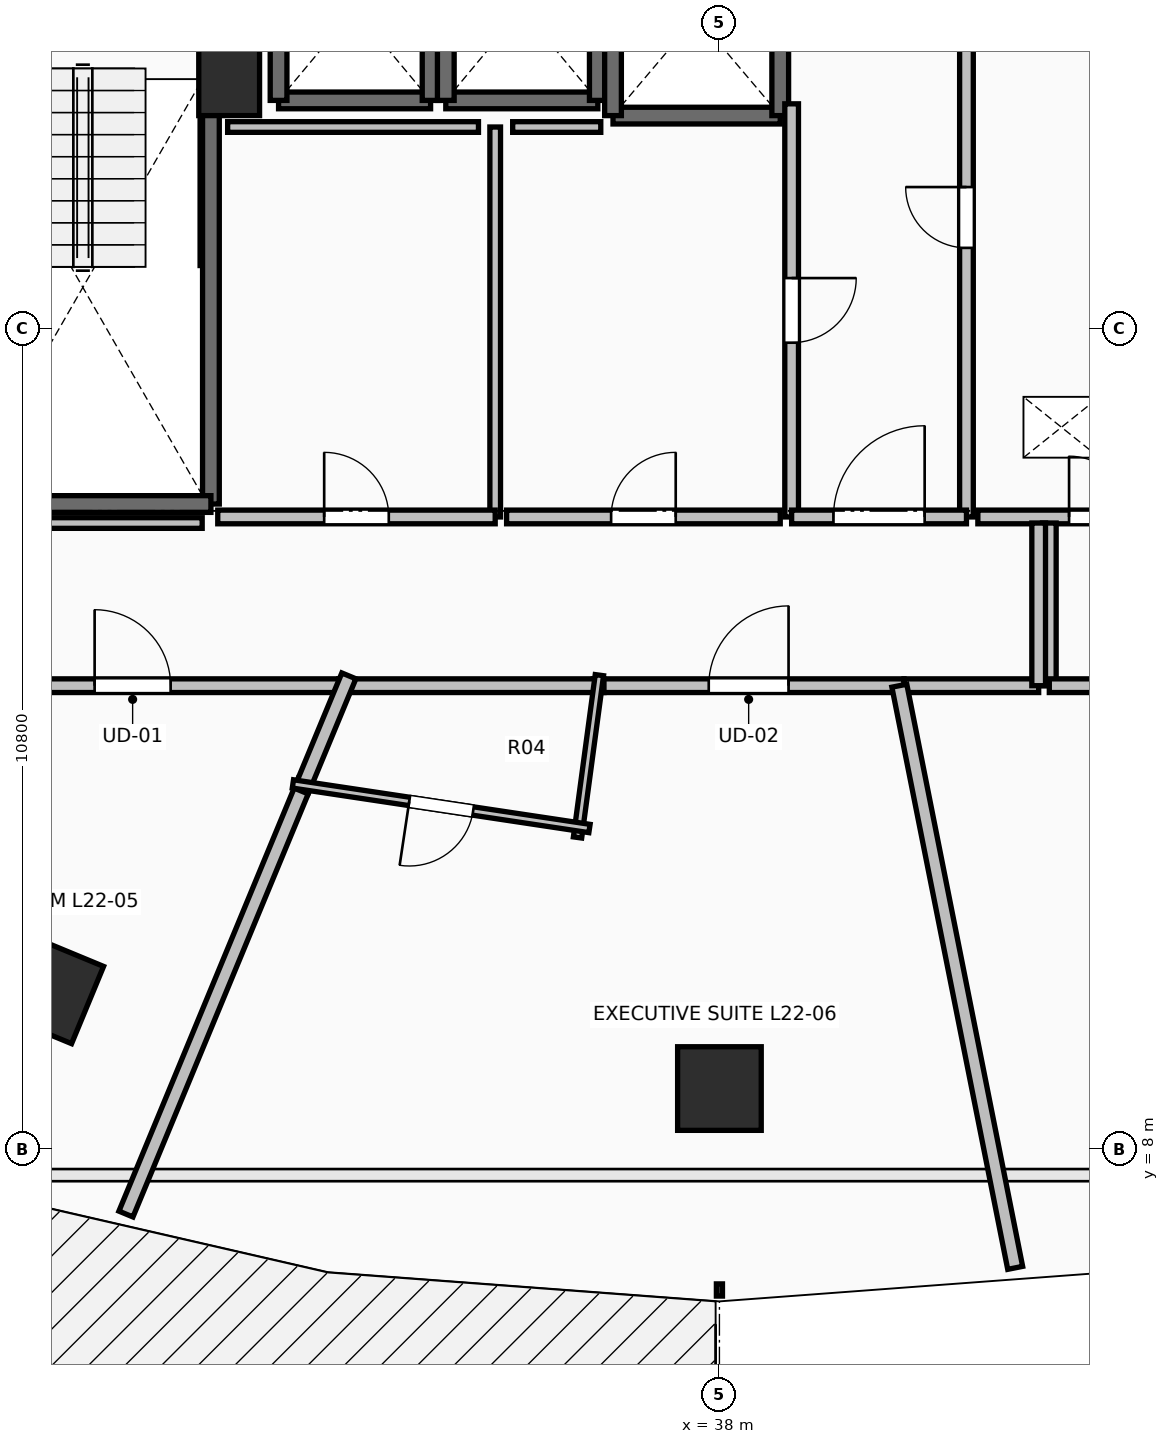
"""IFC4 building model, lengths in metres.
Left out: names, types, materials, properties, quantities, classifications, styles, units other than length and angle.
Written with IfcOpenShell. Run it as: python <this file> out.ifc"""

import sys

from ifc_helpers import new_model, si_unit, direction, frame, frame_2d, origin, origin_2d, place, context, subcontext, project, spatial, rectangle, extrude, element, fill, save


model = new_model("IFC4")
c1 = context("Model", 3, precision=1e-05, world=origin(), true_north=direction((0.0, 1.0)))
c2 = subcontext(c1, "Body", "Model", "MODEL_VIEW")
j1 = project(units=[si_unit("LENGTHUNIT", "METRE"), si_unit("PLANEANGLEUNIT", "RADIAN")], contexts=[c1])
p1 = place(None, origin())
s1 = spatial("IfcSite", under=j1, at=p1, CompositionType="ELEMENT")
p2 = place(p1, origin())
s2 = spatial("IfcBuilding", under=s1, at=p2, CompositionType="ELEMENT")
p3 = place(p2, frame((0.0, 0.0, 85.8)))
s3 = spatial("IfcBuildingStorey", under=s2, at=p3, CompositionType="ELEMENT", Elevation=85.8)
for number, where, z_axis, x_axis in (
    (1, (29.179, 10.109, 0.0), (0.0, 0.0, 1.0), (-0.383, -0.924, 0.0)),
    (2, (38.0, 8.8, 0.0), (0.0, 0.0, 1.0), (0.0, -1.0, 0.0)),
):
    element("IfcColumn", number, at=place(p3, frame(where, z_axis=z_axis, x_axis=x_axis)), inside=s3, PredefinedType="COLUMN", context=c2, shape_type="SweptSolid", body=[
        extrude(rectangle(XDim=1.1, YDim=1.1, at=origin_2d()), origin(), (0.0, 0.0, 1.0), 3.5),
    ])
p4 = place(p3, frame((31.55, 22.2, 0.0), z_axis=(0.0, 0.0, 1.0), x_axis=(1.0, 0.0, 0.0)))
e3 = element("IfcColumn", 3, at=p4, inside=s3, PredefinedType="PILASTER", context=c2, shape_type="SweptSolid", body=[
    extrude(rectangle(XDim=0.8, YDim=1.2, at=origin_2d()), origin(), (0.0, 0.0, 1.0), 3.5),
])
p5 = place(p3, frame((31.31, 23.91, 0.0), z_axis=(0.0, 0.0, 1.0), x_axis=(0.0, -1.0, 0.0)))
e4 = element("IfcWall", 4, at=p5, inside=s3, PredefinedType="SOLIDWALL", context=c2, shape_type="SweptSolid", body=[
    extrude(rectangle(XDim=7.42, YDim=0.22, at=frame_2d((3.71, 0.0))), origin(), (0.0, 0.0, 1.0), 3.24),
])
p6 = place(p3, frame((31.31, 16.49, 0.0), z_axis=(0.0, 0.0, 1.0), x_axis=(-1.0, 0.0, 0.0)))
e5 = element("IfcWall", 5, at=p6, inside=s3, PredefinedType="SOLIDWALL", context=c2, shape_type="SweptSolid", body=[
    extrude(rectangle(XDim=3.37, YDim=0.22, at=frame_2d((1.685, 0.0))), origin(), (0.0, 0.0, 1.0), 3.24),
])
p7 = place(p3, frame((32.2, 21.8, 0.0), z_axis=(0.0, 0.0, 1.0), x_axis=(1.0, 0.0, 0.0)))
e6 = element("IfcWall", 6, at=p7, inside=s3, PredefinedType="SOLIDWALL", context=c2, shape_type="SweptSolid", body=[
    extrude(rectangle(XDim=2.0, YDim=0.22, at=frame_2d((1.0, 0.0))), origin(), (0.0, 0.0, 1.0), 3.24),
])
for number, where, z_axis, x_axis in (
    (7, (34.2, 21.8, 0.0), (0.0, 0.0, 1.0), (0.0, 1.0, 0.0)),
    (8, (32.2, 24.2, 0.0), (0.0, 0.0, 1.0), (0.0, -1.0, 0.0)),
):
    element("IfcWall", number, at=place(p3, frame(where, z_axis=z_axis, x_axis=x_axis)), inside=s3, PredefinedType="SOLIDWALL", context=c2, shape_type="SweptSolid", body=[
        extrude(rectangle(XDim=2.4, YDim=0.22, at=frame_2d((1.2, 0.0))), origin(), (0.0, 0.0, 1.0), 3.24),
    ])
p8 = place(p3, frame((34.4, 21.8, 0.0), z_axis=(0.0, 0.0, 1.0), x_axis=(1.0, 0.0, 0.0)))
e9 = element("IfcWall", 9, at=p8, inside=s3, PredefinedType="SOLIDWALL", context=c2, shape_type="SweptSolid", body=[
    extrude(rectangle(XDim=2.0, YDim=0.22, at=frame_2d((1.0, 0.0))), origin(), (0.0, 0.0, 1.0), 3.24),
])
for number, where, z_axis, x_axis in (
    (10, (36.4, 21.8, 0.0), (0.0, 0.0, 1.0), (0.0, 1.0, 0.0)),
    (11, (34.4, 24.2, 0.0), (0.0, 0.0, 1.0), (0.0, -1.0, 0.0)),
):
    element("IfcWall", number, at=place(p3, frame(where, z_axis=z_axis, x_axis=x_axis)), inside=s3, PredefinedType="SOLIDWALL", context=c2, shape_type="SweptSolid", body=[
        extrude(rectangle(XDim=2.4, YDim=0.22, at=frame_2d((1.2, 0.0))), origin(), (0.0, 0.0, 1.0), 3.24),
    ])
p9 = place(p3, frame((36.6, 21.6, 0.0), z_axis=(0.0, 0.0, 1.0), x_axis=(1.0, 0.0, 0.0)))
e12 = element("IfcWall", 12, at=p9, inside=s3, PredefinedType="SOLIDWALL", context=c2, shape_type="SweptSolid", body=[
    extrude(rectangle(XDim=2.2, YDim=0.22, at=frame_2d((1.1, 0.0))), origin(), (0.0, 0.0, 1.0), 3.24),
])
for number, where, z_axis, x_axis in (
    (13, (38.8, 21.6, 0.0), (0.0, 0.0, 1.0), (0.0, 1.0, 0.0)),
    (14, (36.6, 24.2, 0.0), (0.0, 0.0, 1.0), (0.0, -1.0, 0.0)),
):
    element("IfcWall", number, at=place(p3, frame(where, z_axis=z_axis, x_axis=x_axis)), inside=s3, PredefinedType="SOLIDWALL", context=c2, shape_type="SweptSolid", body=[
        extrude(rectangle(XDim=2.6, YDim=0.22, at=frame_2d((1.3, 0.0))), origin(), (0.0, 0.0, 1.0), 3.24),
    ])
p10 = place(p3, frame((41.25, 16.32, 0.0), z_axis=(0.0, 0.0, 1.0), x_axis=(0.0, 1.0, 0.0)))
e15 = element("IfcWall", 15, at=p10, inside=s3, PredefinedType="PARTITIONING", context=c2, shape_type="SweptSolid", body=[
    extrude(rectangle(XDim=7.88, YDim=0.18, at=frame_2d((3.94, 0.0))), origin(), (0.0, 0.0, 1.0), 3.24),
])
p11 = place(p10, frame((3.54, 0.0, 0.0)))
e16 = element("IfcOpeningElement", 16, at=p11, cuts=e15, PredefinedType="OPENING", context=c2, shape_type="SweptSolid", body=[
    extrude(rectangle(XDim=0.8, YDim=2.05, at=frame_2d((0.4, 1.025))), frame((0.0, 0.105, 0.0), z_axis=(0.0, -1.0, 0.0), x_axis=(1.0, 0.0, 0.0)), (0.0, 0.0, 1.0), 0.21),
])
p12 = place(p3, frame((38.95, 21.755, 0.0), z_axis=(0.0, 0.0, 1.0), x_axis=(0.0, -1.0, 0.0)))
e17 = element("IfcWall", 17, at=p12, inside=s3, PredefinedType="PARTITIONING", context=c2, shape_type="SweptSolid", body=[
    extrude(rectangle(XDim=5.435, YDim=0.18, at=frame_2d((2.717, 0.0))), origin(), (0.0, 0.0, 1.0), 3.24),
])
p13 = place(p12, frame((2.292, 0.0, 0.0)))
e18 = element("IfcOpeningElement", 18, at=p13, cuts=e17, PredefinedType="OPENING", context=c2, shape_type="SweptSolid", body=[
    extrude(rectangle(XDim=0.85, YDim=2.1, at=frame_2d((0.425, 1.05))), frame((0.0, 0.105, 0.0), z_axis=(0.0, -1.0, 0.0), x_axis=(1.0, 0.0, 0.0)), (0.0, 0.0, 1.0), 0.21),
])
p14 = place(p3, frame((38.95, 16.32, 0.0), z_axis=(0.0, 0.0, 1.0), x_axis=(1.0, 0.0, 0.0)))
e19 = element("IfcWall", 19, at=p14, inside=s3, PredefinedType="PARTITIONING", context=c2, shape_type="SweptSolid", body=[
    extrude(rectangle(XDim=2.3, YDim=0.18, at=frame_2d((1.15, 0.0))), origin(), (0.0, 0.0, 1.0), 3.24),
])
p15 = place(p14, frame((0.55, 0.0, 0.0)))
e20 = element("IfcOpeningElement", 20, at=p15, cuts=e19, PredefinedType="OPENING", context=c2, shape_type="SweptSolid", body=[
    extrude(rectangle(XDim=1.2, YDim=2.15, at=frame_2d((0.6, 1.075))), frame((0.0, 0.105, 0.0), z_axis=(0.0, -1.0, 0.0), x_axis=(1.0, 0.0, 0.0)), (0.0, 0.0, 1.0), 0.21),
])
p16 = place(p3, frame((41.4, 16.32, 0.0), z_axis=(0.0, 0.0, 1.0), x_axis=(1.0, 0.0, 0.0)))
e21 = element("IfcWall", 21, at=p16, inside=s3, PredefinedType="PARTITIONING", context=c2, shape_type="SweptSolid", body=[
    extrude(rectangle(XDim=3.2, YDim=0.18, at=frame_2d((1.6, 0.0))), origin(), (0.0, 0.0, 1.0), 3.24),
])
p17 = place(p16, frame((1.2, 0.0, 0.0)))
e22 = element("IfcOpeningElement", 22, at=p17, cuts=e21, PredefinedType="OPENING", context=c2, shape_type="SweptSolid", body=[
    extrude(rectangle(XDim=0.8, YDim=2.05, at=frame_2d((0.4, 1.025))), frame((0.0, 0.105, 0.0), z_axis=(0.0, -1.0, 0.0), x_axis=(1.0, 0.0, 0.0)), (0.0, 0.0, 1.0), 0.21),
])
p18 = place(p3, frame((35.05, 16.32, 0.0), z_axis=(0.0, 0.0, 1.0), x_axis=(0.0, 1.0, 0.0)))
e23 = element("IfcWall", 23, at=p18, inside=s3, PredefinedType="PARTITIONING", context=c2, shape_type="SweptSolid", body=[
    extrude(rectangle(XDim=5.13, YDim=0.14, at=frame_2d((2.565, 0.0))), origin(), (0.0, 0.0, 1.0), 3.24),
])
p19 = place(p3, frame((31.4, 16.32, 0.0), z_axis=(0.0, 0.0, 1.0), x_axis=(1.0, 0.0, 0.0)))
e24 = element("IfcWall", 24, at=p19, inside=s3, PredefinedType="PARTITIONING", context=c2, shape_type="SweptSolid", body=[
    extrude(rectangle(XDim=3.65, YDim=0.18, at=frame_2d((1.825, 0.0))), origin(), (0.0, 0.0, 1.0), 3.24),
])
p20 = place(p19, frame((1.4, 0.0, 0.0)))
e25 = element("IfcOpeningElement", 25, at=p20, cuts=e24, PredefinedType="OPENING", context=c2, shape_type="SweptSolid", body=[
    extrude(rectangle(XDim=0.85, YDim=2.1, at=frame_2d((0.425, 1.05))), frame((0.0, 0.105, 0.0), z_axis=(0.0, -1.0, 0.0), x_axis=(1.0, 0.0, 0.0)), (0.0, 0.0, 1.0), 0.21),
])
p21 = place(p3, frame((35.2, 16.32, 0.0), z_axis=(0.0, 0.0, 1.0), x_axis=(1.0, 0.0, 0.0)))
e26 = element("IfcWall", 26, at=p21, inside=s3, PredefinedType="PARTITIONING", context=c2, shape_type="SweptSolid", body=[
    extrude(rectangle(XDim=3.6, YDim=0.18, at=frame_2d((1.8, 0.0))), origin(), (0.0, 0.0, 1.0), 3.24),
])
p22 = place(p21, frame((1.375, 0.0, 0.0)))
e27 = element("IfcOpeningElement", 27, at=p22, cuts=e26, PredefinedType="OPENING", context=c2, shape_type="SweptSolid", body=[
    extrude(rectangle(XDim=0.85, YDim=2.1, at=frame_2d((0.425, 1.05))), frame((0.0, 0.105, 0.0), z_axis=(0.0, -1.0, 0.0), x_axis=(1.0, 0.0, 0.0)), (0.0, 0.0, 1.0), 0.21),
])
p23 = place(p3, frame((27.429, 14.1, 0.0), z_axis=(0.0, 0.0, 1.0), x_axis=(1.0, 0.0, 0.0)))
e28 = element("IfcWall", 28, at=p23, inside=s3, PredefinedType="PARTITIONING", context=c2, shape_type="SweptSolid", body=[
    extrude(rectangle(XDim=5.702, YDim=0.18, at=frame_2d((2.851, 0.0))), origin(), (0.0, 0.0, 1.0), 2.432),
])
p24 = place(p23, frame((2.351, 0.0, 0.0)))
e29 = element("IfcOpeningElement", 29, at=p24, cuts=e28, PredefinedType="OPENING", context=c2, shape_type="SweptSolid", body=[
    extrude(rectangle(XDim=1.0, YDim=2.15, at=frame_2d((0.5, 1.075))), frame((0.0, 0.105, 0.0), z_axis=(0.0, -1.0, 0.0), x_axis=(1.0, 0.0, 0.0)), (0.0, 0.0, 1.0), 0.21),
])
p25 = place(p3, frame((36.341, 14.1, 0.0), z_axis=(0.0, 0.0, 1.0), x_axis=(1.0, 0.0, 0.0)))
e30 = element("IfcWall", 30, at=p25, inside=s3, PredefinedType="PARTITIONING", context=c2, shape_type="SweptSolid", body=[
    extrude(rectangle(XDim=4.087, YDim=0.18, at=frame_2d((2.043, 0.0))), origin(), (0.0, 0.0, 1.0), 2.922),
])
p26 = place(p25, frame((1.519, 0.0, 0.0)))
e31 = element("IfcOpeningElement", 31, at=p26, cuts=e30, PredefinedType="OPENING", context=c2, shape_type="SweptSolid", body=[
    extrude(rectangle(XDim=1.05, YDim=2.2, at=frame_2d((0.525, 1.1))), frame((0.0, 0.105, 0.0), z_axis=(0.0, -1.0, 0.0), x_axis=(1.0, 0.0, 0.0)), (0.0, 0.0, 1.0), 0.21),
])
p27 = place(p3, frame((32.991, 14.1, 0.0), z_axis=(0.0, 0.0, 1.0), x_axis=(1.0, 0.0, 0.0)))
e32 = element("IfcWall", 32, at=p27, inside=s3, PredefinedType="PARTITIONING", context=c2, shape_type="SweptSolid", body=[
    extrude(rectangle(XDim=3.49, YDim=0.18, at=frame_2d((1.745, 0.0))), origin(), (0.0, 0.0, 1.0), 2.922),
])
p28 = place(p3, frame((42.34, 16.24, 0.0), z_axis=(0.0, 0.0, 1.0), x_axis=(0.0, -1.0, 0.0)))
e33 = element("IfcWall", 33, at=p28, inside=s3, PredefinedType="PARTITIONING", context=c2, shape_type="SweptSolid", body=[
    extrude(rectangle(XDim=2.14, YDim=0.18, at=frame_2d((1.07, 0.0))), origin(), (0.0, 0.0, 1.0), 2.922),
])
p29 = place(p3, frame((42.34, 14.1, 0.0), z_axis=(0.0, 0.0, 1.0), x_axis=(1.0, 0.0, 0.0)))
e34 = element("IfcWall", 34, at=p29, inside=s3, PredefinedType="PARTITIONING", context=c2, shape_type="SweptSolid", body=[
    extrude(rectangle(XDim=8.41, YDim=0.18, at=frame_2d((4.205, 0.0))), origin(), (0.0, 0.0, 1.0), 2.432),
])
p30 = place(p29, frame((3.705, 0.0, 0.0)))
e35 = element("IfcOpeningElement", 35, at=p30, cuts=e34, PredefinedType="OPENING", context=c2, shape_type="SweptSolid", body=[
    extrude(rectangle(XDim=1.0, YDim=2.15, at=frame_2d((0.5, 1.075))), frame((0.0, 0.105, 0.0), z_axis=(0.0, -1.0, 0.0), x_axis=(1.0, 0.0, 0.0)), (0.0, 0.0, 1.0), 0.21),
])
p31 = place(p3, frame((40.428, 14.1, 0.0), z_axis=(0.0, 0.0, 1.0), x_axis=(1.0, 0.0, 0.0)))
e36 = element("IfcWall", 36, at=p31, inside=s3, PredefinedType="PARTITIONING", context=c2, shape_type="SweptSolid", body=[
    extrude(rectangle(XDim=1.772, YDim=0.18, at=frame_2d((0.886, 0.0))), origin(), (0.0, 0.0, 1.0), 2.922),
])
p32 = place(p3, frame((42.2, 14.1, 0.0), z_axis=(0.0, 0.0, 1.0), x_axis=(0.0, 1.0, 0.0)))
e37 = element("IfcWall", 37, at=p32, inside=s3, PredefinedType="PARTITIONING", context=c2, shape_type="SweptSolid", body=[
    extrude(rectangle(XDim=2.14, YDim=0.18, at=frame_2d((1.07, 0.0))), origin(), (0.0, 0.0, 1.0), 2.922),
])
p33 = place(p3, frame((30.192, 7.149, 0.0), z_axis=(0.0, 0.0, 1.0), x_axis=(0.382705075352, 0.923870567395, 0.0)))
e38 = element("IfcWall", 38, at=p33, inside=s3, PredefinedType="PARTITIONING", context=c2, shape_type="SweptSolid", body=[
    extrude(rectangle(XDim=6.164, YDim=0.2, at=frame_2d((3.082, 0.0))), origin(), (0.0, 0.0, 1.0), 2.677),
])
p34 = place(p3, frame((32.497, 12.715, 0.0), z_axis=(0.0, 0.0, 1.0), x_axis=(0.382891039503, 0.923793511489, 0.0)))
e39 = element("IfcWall", 39, at=p34, inside=s3, PredefinedType="PARTITIONING", context=c2, shape_type="SweptSolid", body=[
    extrude(rectangle(XDim=1.639, YDim=0.2, at=frame_2d((0.82, 0.0))), origin(), (0.0, 0.0, 1.0), 2.922),
])
p35 = place(p3, frame((36.421, 14.239, 0.0), z_axis=(0.0, 0.0, 1.0), x_axis=(-0.133358508544, -0.99106786256, 0.0)))
e40 = element("IfcWall", 40, at=p35, inside=s3, PredefinedType="PARTITIONING", context=c2, shape_type="SweptSolid", body=[
    extrude(rectangle(XDim=2.155, YDim=0.11, at=frame_2d((1.077, 0.0))), origin(), (0.0, 0.0, 1.0), 2.922),
])
p36 = place(p3, frame((36.29, 12.221, 0.0), z_axis=(0.0, 0.0, 1.0), x_axis=(-0.988883185792, 0.148694468147, 0.0)))
e41 = element("IfcWall", 41, at=p36, inside=s3, PredefinedType="PARTITIONING", context=c2, shape_type="SweptSolid", body=[
    extrude(rectangle(XDim=3.946, YDim=0.11, at=frame_2d((1.973, 0.0))), origin(), (0.0, 0.0, 1.0), 3.24),
])
p37 = place(p36, frame((1.548, 0.0, 0.0)))
e42 = element("IfcOpeningElement", 42, at=p37, cuts=e41, PredefinedType="OPENING", context=c2, shape_type="SweptSolid", body=[
    extrude(rectangle(XDim=0.85, YDim=2.1, at=frame_2d((0.425, 1.05))), frame((0.0, 0.07, 0.0), z_axis=(0.0, -1.0, 0.0), x_axis=(1.0, 0.0, 0.0)), (0.0, 0.0, 1.0), 0.14),
])
p38 = place(p3, frame((41.891, 6.441, 0.0), z_axis=(0.0, 0.0, 1.0), x_axis=(-0.195172155482, 0.980768999166, 0.0)))
e43 = element("IfcWall", 43, at=p38, inside=s3, PredefinedType="PARTITIONING", context=c2, shape_type="SweptSolid", body=[
    extrude(rectangle(XDim=7.809, YDim=0.2, at=frame_2d((3.905, 0.0))), origin(), (0.0, 0.0, 1.0), 2.432),
])
p39 = place(p3, frame((34.83, 21.45, 0.0), z_axis=(0.0, 0.0, 1.0), x_axis=(-1.0, 0.0, 0.0)))
e44 = element("IfcWall", 44, at=p39, inside=s3, PredefinedType="PARTITIONING", context=c2, shape_type="SweptSolid", body=[
    extrude(rectangle(XDim=3.3, YDim=0.14, at=frame_2d((1.65, 0.0))), origin(), (0.0, 0.0, 1.0), 3.24),
])
p40 = place(p3, frame((36.439, 21.45, 0.0), z_axis=(0.0, 0.0, 1.0), x_axis=(-1.0, 0.0, 0.0)))
e45 = element("IfcWall", 45, at=p40, inside=s3, PredefinedType="PARTITIONING", context=c2, shape_type="SweptSolid", body=[
    extrude(rectangle(XDim=1.159, YDim=0.14, at=frame_2d((0.58, 0.0))), origin(), (0.0, 0.0, 1.0), 3.24),
])
p41 = place(p3, frame((31.195, 16.24, 0.0), z_axis=(0.0, 0.0, 1.0), x_axis=(-1.0, 0.0, 0.0)))
e46 = element("IfcWall", 46, at=p41, inside=s3, PredefinedType="PARTITIONING", context=c2, shape_type="SweptSolid", body=[
    extrude(rectangle(XDim=3.745, YDim=0.14, at=frame_2d((1.873, 0.0))), origin(), (0.0, 0.0, 1.0), 2.432),
])
p42 = place(p11, origin())
e47 = element("IfcDoor", 47, at=p42, inside=s3, OperationType="SINGLE_SWING_RIGHT", PredefinedType="DOOR", context=c2, shape_type="SweptSolid", body=[
    extrude(rectangle(XDim=0.8, YDim=2.05, at=frame_2d((0.4, 1.025))), frame((0.0, 0.025, 0.0), z_axis=(0.0, -1.0, 0.0), x_axis=(1.0, 0.0, 0.0)), (0.0, 0.0, 1.0), 0.05),
])
fill(e16, e47)
p43 = place(p13, origin())
e48 = element("IfcDoor", 48, at=p43, inside=s3, OperationType="SINGLE_SWING_LEFT", PredefinedType="DOOR", context=c2, shape_type="SweptSolid", body=[
    extrude(rectangle(XDim=0.85, YDim=2.1, at=frame_2d((0.425, 1.05))), frame((0.0, 0.025, 0.0), z_axis=(0.0, -1.0, 0.0), x_axis=(1.0, 0.0, 0.0)), (0.0, 0.0, 1.0), 0.05),
])
fill(e18, e48)
p44 = place(p15, origin())
e49 = element("IfcDoor", 49, at=p44, inside=s3, OperationType="SINGLE_SWING_RIGHT", PredefinedType="DOOR", context=c2, shape_type="SweptSolid", body=[
    extrude(rectangle(XDim=1.2, YDim=2.15, at=frame_2d((0.6, 1.075))), frame((0.0, 0.025, 0.0), z_axis=(0.0, -1.0, 0.0), x_axis=(1.0, 0.0, 0.0)), (0.0, 0.0, 1.0), 0.05),
])
fill(e20, e49)
p45 = place(p17, origin())
e50 = element("IfcDoor", 50, at=p45, inside=s3, OperationType="SINGLE_SWING_LEFT", PredefinedType="DOOR", context=c2, shape_type="SweptSolid", body=[
    extrude(rectangle(XDim=0.8, YDim=2.05, at=frame_2d((0.4, 1.025))), frame((0.0, 0.025, 0.0), z_axis=(0.0, -1.0, 0.0), x_axis=(1.0, 0.0, 0.0)), (0.0, 0.0, 1.0), 0.05),
])
fill(e22, e50)
p46 = place(p20, origin())
e51 = element("IfcDoor", 51, at=p46, inside=s3, OperationType="SINGLE_SWING_LEFT", PredefinedType="DOOR", context=c2, shape_type="SweptSolid", body=[
    extrude(rectangle(XDim=0.85, YDim=2.1, at=frame_2d((0.425, 1.05))), frame((0.0, 0.025, 0.0), z_axis=(0.0, -1.0, 0.0), x_axis=(1.0, 0.0, 0.0)), (0.0, 0.0, 1.0), 0.05),
])
fill(e25, e51)
p47 = place(p22, origin())
e52 = element("IfcDoor", 52, at=p47, inside=s3, OperationType="SINGLE_SWING_RIGHT", PredefinedType="DOOR", context=c2, shape_type="SweptSolid", body=[
    extrude(rectangle(XDim=0.85, YDim=2.1, at=frame_2d((0.425, 1.05))), frame((0.0, 0.025, 0.0), z_axis=(0.0, -1.0, 0.0), x_axis=(1.0, 0.0, 0.0)), (0.0, 0.0, 1.0), 0.05),
])
fill(e27, e52)
p48 = place(p24, origin())
e53 = element("IfcDoor", 53, at=p48, inside=s3, OperationType="SINGLE_SWING_LEFT", PredefinedType="DOOR", context=c2, shape_type="SweptSolid", body=[
    extrude(rectangle(XDim=1.0, YDim=2.15, at=frame_2d((0.5, 1.075))), frame((0.0, 0.025, 0.0), z_axis=(0.0, -1.0, 0.0), x_axis=(1.0, 0.0, 0.0)), (0.0, 0.0, 1.0), 0.05),
])
fill(e29, e53)
p49 = place(p26, origin())
e54 = element("IfcDoor", 54, at=p49, inside=s3, OperationType="SINGLE_SWING_RIGHT", PredefinedType="DOOR", context=c2, shape_type="SweptSolid", body=[
    extrude(rectangle(XDim=1.05, YDim=2.2, at=frame_2d((0.525, 1.1))), frame((0.0, 0.025, 0.0), z_axis=(0.0, -1.0, 0.0), x_axis=(1.0, 0.0, 0.0)), (0.0, 0.0, 1.0), 0.05),
])
fill(e31, e54)
p50 = place(p37, origin())
e55 = element("IfcDoor", 55, at=p50, inside=s3, OperationType="SINGLE_SWING_RIGHT", PredefinedType="DOOR", context=c2, shape_type="SweptSolid", body=[
    extrude(rectangle(XDim=0.85, YDim=2.1, at=frame_2d((0.425, 1.05))), frame((0.0, 0.025, 0.0), z_axis=(0.0, -1.0, 0.0), x_axis=(1.0, 0.0, 0.0)), (0.0, 0.0, 1.0), 0.05),
])
fill(e42, e55)
save(model, sys.argv[1])
